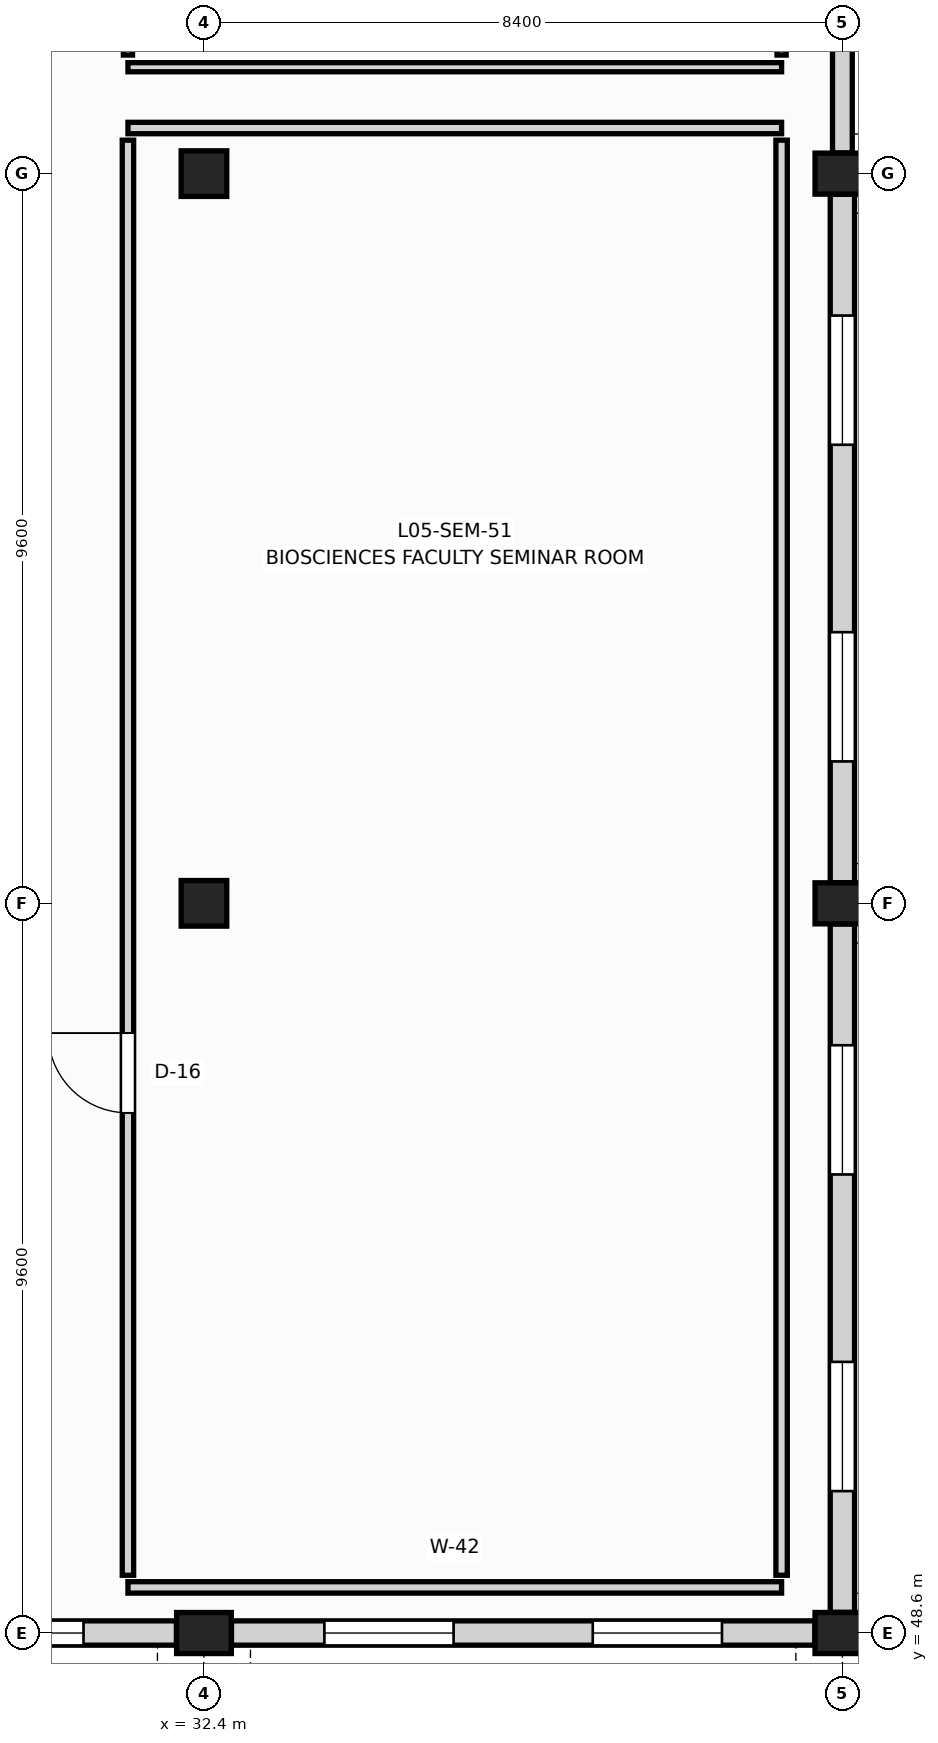
"""IFC4 building model, lengths in metres.
Left out: names, types, materials, properties, quantities, classifications, styles, units other than length and angle.
Written with IfcOpenShell. Run it as: python <this file> out.ifc"""

import sys

from ifc_helpers import new_model, si_unit, direction, frame, frame_2d, origin, origin_2d, place, context, subcontext, project, spatial, rectangle, extrude, element, fill, save


model = new_model("IFC4")
c1 = context("Model", 3, precision=1e-05, world=origin(), true_north=direction((0.0, 1.0)))
c2 = subcontext(c1, "Body", "Model", "MODEL_VIEW")
j1 = project(units=[si_unit("LENGTHUNIT", "METRE"), si_unit("PLANEANGLEUNIT", "RADIAN")], contexts=[c1])
p1 = place(None, origin())
s1 = spatial("IfcSite", under=j1, at=p1, CompositionType="ELEMENT")
p2 = place(p1, origin())
s2 = spatial("IfcBuilding", under=s1, at=p2, CompositionType="ELEMENT")
p3 = place(p2, frame((0.0, 0.0, 22.5)))
s3 = spatial("IfcBuildingStorey", under=s2, at=p3, CompositionType="ELEMENT", Elevation=22.5)
p4 = place(p3, frame((32.4, 48.6, 0.0), z_axis=(0.0, 0.0, 1.0), x_axis=(1.0, 0.0, 0.0)))
e1 = element("IfcColumn", 1, at=p4, inside=s3, PredefinedType="COLUMN", context=c2, shape_type="SweptSolid", body=[
    extrude(rectangle(XDim=0.72, YDim=0.54, at=origin_2d()), origin(), (0.0, 0.0, 1.0), 3.98),
])
for number, where, z_axis, x_axis in (
    (2, (32.4, 58.2, 0.0), (0.0, 0.0, 1.0), (1.0, 0.0, 0.0)),
    (3, (32.4, 67.8, 0.0), (0.0, 0.0, 1.0), (1.0, 0.0, 0.0)),
):
    element("IfcColumn", number, at=place(p3, frame(where, z_axis=z_axis, x_axis=x_axis)), inside=s3, PredefinedType="COLUMN", context=c2, shape_type="SweptSolid", body=[
        extrude(rectangle(XDim=0.6, YDim=0.6, at=origin_2d()), origin(), (0.0, 0.0, 1.0), 3.98),
    ])
for number, where, z_axis, x_axis in (
    (4, (40.8, 48.6, 0.0), (0.0, 0.0, 1.0), (1.0, 0.0, 0.0)),
    (5, (40.8, 58.2, 0.0), (0.0, 0.0, 1.0), (1.0, 0.0, 0.0)),
    (6, (40.8, 67.8, 0.0), (0.0, 0.0, 1.0), (1.0, 0.0, 0.0)),
):
    element("IfcColumn", number, at=place(p3, frame(where, z_axis=z_axis, x_axis=x_axis)), inside=s3, PredefinedType="COLUMN", context=c2, shape_type="SweptSolid", body=[
        extrude(rectangle(XDim=0.72, YDim=0.54, at=origin_2d()), origin(), (0.0, 0.0, 1.0), 3.98),
    ])
p5 = place(p3, frame((40.8, 48.872, 0.0), z_axis=(0.0, 0.0, 1.0), x_axis=(0.0, 1.0, 0.0)))
e7 = element("IfcWall", 7, at=p5, inside=s3, PredefinedType="SOLIDWALL", context=c2, shape_type="SweptSolid", body=[
    extrude(rectangle(XDim=9.056, YDim=0.32, at=frame_2d((4.528, 0.0))), origin(), (0.0, 0.0, 1.0), 3.08),
])
p6 = place(p5, frame((1.595, 0.0, 0.9)))
e8 = element("IfcOpeningElement", 8, at=p6, cuts=e7, PredefinedType="OPENING", context=c2, shape_type="SweptSolid", body=[
    extrude(rectangle(XDim=1.7, YDim=1.8, at=frame_2d((0.85, 0.9))), frame((0.0, 0.17, 0.0), z_axis=(0.0, -1.0, 0.0), x_axis=(1.0, 0.0, 0.0)), (0.0, 0.0, 1.0), 0.34),
])
p7 = place(p5, frame((5.761, 0.0, 0.9)))
e9 = element("IfcOpeningElement", 9, at=p7, cuts=e7, PredefinedType="OPENING", context=c2, shape_type="SweptSolid", body=[
    extrude(rectangle(XDim=1.7, YDim=1.8, at=frame_2d((0.85, 0.9))), frame((0.0, 0.17, 0.0), z_axis=(0.0, -1.0, 0.0), x_axis=(1.0, 0.0, 0.0)), (0.0, 0.0, 1.0), 0.34),
])
p8 = place(p3, frame((40.8, 58.472, 0.0), z_axis=(0.0, 0.0, 1.0), x_axis=(0.0, 1.0, 0.0)))
e10 = element("IfcWall", 10, at=p8, inside=s3, PredefinedType="SOLIDWALL", context=c2, shape_type="SweptSolid", body=[
    extrude(rectangle(XDim=9.056, YDim=0.32, at=frame_2d((4.528, 0.0))), origin(), (0.0, 0.0, 1.0), 3.08),
])
p9 = place(p8, frame((1.595, 0.0, 0.9)))
e11 = element("IfcOpeningElement", 11, at=p9, cuts=e10, PredefinedType="OPENING", context=c2, shape_type="SweptSolid", body=[
    extrude(rectangle(XDim=1.7, YDim=1.8, at=frame_2d((0.85, 0.9))), frame((0.0, 0.17, 0.0), z_axis=(0.0, -1.0, 0.0), x_axis=(1.0, 0.0, 0.0)), (0.0, 0.0, 1.0), 0.34),
])
p10 = place(p8, frame((5.761, 0.0, 0.9)))
e12 = element("IfcOpeningElement", 12, at=p10, cuts=e10, PredefinedType="OPENING", context=c2, shape_type="SweptSolid", body=[
    extrude(rectangle(XDim=1.7, YDim=1.8, at=frame_2d((0.85, 0.9))), frame((0.0, 0.17, 0.0), z_axis=(0.0, -1.0, 0.0), x_axis=(1.0, 0.0, 0.0)), (0.0, 0.0, 1.0), 0.34),
])
p11 = place(p3, frame((40.8, 68.072, 0.0), z_axis=(0.0, 0.0, 1.0), x_axis=(0.0, 1.0, 0.0)))
e13 = element("IfcWall", 13, at=p11, inside=s3, PredefinedType="SOLIDWALL", context=c2, shape_type="SweptSolid", body=[
    extrude(rectangle(XDim=9.056, YDim=0.26, at=frame_2d((4.528, 0.0))), origin(), (0.0, 0.0, 1.0), 3.08),
])
p12 = place(p11, frame((1.595, 0.0, 0.9)))
e14 = element("IfcOpeningElement", 14, at=p12, cuts=e13, PredefinedType="OPENING", context=c2, shape_type="SweptSolid", body=[
    extrude(rectangle(XDim=1.7, YDim=1.8, at=frame_2d((0.85, 0.9))), frame((0.0, 0.14, 0.0), z_axis=(0.0, -1.0, 0.0), x_axis=(1.0, 0.0, 0.0)), (0.0, 0.0, 1.0), 0.28),
])
p13 = place(p11, frame((5.761, 0.0, 0.9)))
e15 = element("IfcOpeningElement", 15, at=p13, cuts=e13, PredefinedType="OPENING", context=c2, shape_type="SweptSolid", body=[
    extrude(rectangle(XDim=1.7, YDim=1.8, at=frame_2d((0.85, 0.9))), frame((0.0, 0.14, 0.0), z_axis=(0.0, -1.0, 0.0), x_axis=(1.0, 0.0, 0.0)), (0.0, 0.0, 1.0), 0.28),
])
p14 = place(p3, frame((24.362, 48.6, 0.0), z_axis=(0.0, 0.0, 1.0), x_axis=(1.0, 0.0, 0.0)))
e16 = element("IfcWall", 16, at=p14, inside=s3, PredefinedType="SOLIDWALL", context=c2, shape_type="SweptSolid", body=[
    extrude(rectangle(XDim=7.676, YDim=0.32, at=frame_2d((3.838, 0.0))), origin(), (0.0, 0.0, 1.0), 3.08),
])
p15 = place(p14, frame((1.222, 0.0, 0.9)))
e17 = element("IfcOpeningElement", 17, at=p15, cuts=e16, PredefinedType="OPENING", context=c2, shape_type="SweptSolid", body=[
    extrude(rectangle(XDim=1.7, YDim=1.8, at=frame_2d((0.85, 0.9))), frame((0.0, 0.17, 0.0), z_axis=(0.0, -1.0, 0.0), x_axis=(1.0, 0.0, 0.0)), (0.0, 0.0, 1.0), 0.34),
])
p16 = place(p14, frame((4.753, 0.0, 0.9)))
e18 = element("IfcOpeningElement", 18, at=p16, cuts=e16, PredefinedType="OPENING", context=c2, shape_type="SweptSolid", body=[
    extrude(rectangle(XDim=1.7, YDim=1.8, at=frame_2d((0.85, 0.9))), frame((0.0, 0.17, 0.0), z_axis=(0.0, -1.0, 0.0), x_axis=(1.0, 0.0, 0.0)), (0.0, 0.0, 1.0), 0.34),
])
p17 = place(p3, frame((32.762, 48.6, 0.0), z_axis=(0.0, 0.0, 1.0), x_axis=(1.0, 0.0, 0.0)))
e19 = element("IfcWall", 19, at=p17, inside=s3, PredefinedType="SOLIDWALL", context=c2, shape_type="SweptSolid", body=[
    extrude(rectangle(XDim=7.676, YDim=0.32, at=frame_2d((3.838, 0.0))), origin(), (0.0, 0.0, 1.0), 3.08),
])
p18 = place(p17, frame((1.222, 0.0, 0.9)))
e20 = element("IfcOpeningElement", 20, at=p18, cuts=e19, PredefinedType="OPENING", context=c2, shape_type="SweptSolid", body=[
    extrude(rectangle(XDim=1.7, YDim=1.8, at=frame_2d((0.85, 0.9))), frame((0.0, 0.17, 0.0), z_axis=(0.0, -1.0, 0.0), x_axis=(1.0, 0.0, 0.0)), (0.0, 0.0, 1.0), 0.34),
])
p19 = place(p17, frame((4.753, 0.0, 0.9)))
e21 = element("IfcOpeningElement", 21, at=p19, cuts=e19, PredefinedType="OPENING", context=c2, shape_type="SweptSolid", body=[
    extrude(rectangle(XDim=1.7, YDim=1.8, at=frame_2d((0.85, 0.9))), frame((0.0, 0.17, 0.0), z_axis=(0.0, -1.0, 0.0), x_axis=(1.0, 0.0, 0.0)), (0.0, 0.0, 1.0), 0.34),
])
for number, where, z_axis, x_axis in (
    (22, (31.4, 49.2, 0.0), (0.0, 0.0, 1.0), (1.0, 0.0, 0.0)),
    (23, (31.4, 68.4, 0.0), (0.0, 0.0, 1.0), (1.0, 0.0, 0.0)),
):
    element("IfcWall", number, at=place(p3, frame(where, z_axis=z_axis, x_axis=x_axis)), inside=s3, PredefinedType="PARTITIONING", context=c2, shape_type="SweptSolid", body=[
        extrude(rectangle(XDim=8.6, YDim=0.15, at=frame_2d((4.3, 0.0))), origin(), (0.0, 0.0, 1.0), 3.15),
    ])
p20 = place(p3, frame((31.4, 49.36, 0.0), z_axis=(0.0, 0.0, 1.0), x_axis=(0.0, 1.0, 0.0)))
e24 = element("IfcWall", 24, at=p20, inside=s3, PredefinedType="PARTITIONING", context=c2, shape_type="SweptSolid", body=[
    extrude(rectangle(XDim=18.88, YDim=0.15, at=frame_2d((9.44, 0.0))), origin(), (0.0, 0.0, 1.0), 3.15),
])
p21 = place(p20, frame((6.083, 0.0, 0.0)))
e25 = element("IfcOpeningElement", 25, at=p21, cuts=e24, PredefinedType="OPENING", context=c2, shape_type="SweptSolid", body=[
    extrude(rectangle(XDim=1.05, YDim=2.2, at=frame_2d((0.525, 1.1))), frame((0.0, 0.085, 0.0), z_axis=(0.0, -1.0, 0.0), x_axis=(1.0, 0.0, 0.0)), (0.0, 0.0, 1.0), 0.17),
])
p22 = place(p3, frame((40.0, 49.36, 0.0), z_axis=(0.0, 0.0, 1.0), x_axis=(0.0, 1.0, 0.0)))
e26 = element("IfcWall", 26, at=p22, inside=s3, PredefinedType="PARTITIONING", context=c2, shape_type="SweptSolid", body=[
    extrude(rectangle(XDim=18.88, YDim=0.15, at=frame_2d((9.44, 0.0))), origin(), (0.0, 0.0, 1.0), 3.15),
])
p23 = place(p3, frame((31.4, 69.2, 0.0), z_axis=(0.0, 0.0, 1.0), x_axis=(1.0, 0.0, 0.0)))
e27 = element("IfcWall", 27, at=p23, inside=s3, PredefinedType="PARTITIONING", context=c2, shape_type="SweptSolid", body=[
    extrude(rectangle(XDim=8.6, YDim=0.12, at=frame_2d((4.3, 0.0))), origin(), (0.0, 0.0, 1.0), 3.15),
])
p24 = place(p3, frame((31.4, 69.36, 0.0), z_axis=(0.0, 0.0, 1.0), x_axis=(0.0, 1.0, 0.0)))
e28 = element("IfcWall", 28, at=p24, inside=s3, PredefinedType="PARTITIONING", context=c2, shape_type="SweptSolid", body=[
    extrude(rectangle(XDim=16.68, YDim=0.12, at=frame_2d((8.34, 0.0))), origin(), (0.0, 0.0, 1.0), 3.15),
])
p25 = place(p24, frame((5.363, 0.0, 0.0)))
e29 = element("IfcOpeningElement", 29, at=p25, cuts=e28, PredefinedType="OPENING", context=c2, shape_type="SweptSolid", body=[
    extrude(rectangle(XDim=0.95, YDim=2.15, at=frame_2d((0.475, 1.075))), frame((0.0, 0.07, 0.0), z_axis=(0.0, -1.0, 0.0), x_axis=(1.0, 0.0, 0.0)), (0.0, 0.0, 1.0), 0.14),
])
p26 = place(p3, frame((40.0, 69.36, 0.0), z_axis=(0.0, 0.0, 1.0), x_axis=(0.0, 1.0, 0.0)))
e30 = element("IfcWall", 30, at=p26, inside=s3, PredefinedType="PARTITIONING", context=c2, shape_type="SweptSolid", body=[
    extrude(rectangle(XDim=16.68, YDim=0.12, at=frame_2d((8.34, 0.0))), origin(), (0.0, 0.0, 1.0), 3.15),
])
p27 = place(p6, origin())
e31 = element("IfcWindow", 31, at=p27, inside=s3, PartitioningType="SINGLE_PANEL", PredefinedType="WINDOW", context=c2, shape_type="SweptSolid", body=[
    extrude(rectangle(XDim=1.7, YDim=1.8, at=frame_2d((0.85, 0.9))), frame((0.0, 0.03, 0.0), z_axis=(0.0, -1.0, 0.0), x_axis=(1.0, 0.0, 0.0)), (0.0, 0.0, 1.0), 0.06),
])
fill(e8, e31)
p28 = place(p7, origin())
e32 = element("IfcWindow", 32, at=p28, inside=s3, PartitioningType="SINGLE_PANEL", PredefinedType="WINDOW", context=c2, shape_type="SweptSolid", body=[
    extrude(rectangle(XDim=1.7, YDim=1.8, at=frame_2d((0.85, 0.9))), frame((0.0, 0.03, 0.0), z_axis=(0.0, -1.0, 0.0), x_axis=(1.0, 0.0, 0.0)), (0.0, 0.0, 1.0), 0.06),
])
fill(e9, e32)
p29 = place(p9, origin())
e33 = element("IfcWindow", 33, at=p29, inside=s3, PartitioningType="SINGLE_PANEL", PredefinedType="WINDOW", context=c2, shape_type="SweptSolid", body=[
    extrude(rectangle(XDim=1.7, YDim=1.8, at=frame_2d((0.85, 0.9))), frame((0.0, 0.03, 0.0), z_axis=(0.0, -1.0, 0.0), x_axis=(1.0, 0.0, 0.0)), (0.0, 0.0, 1.0), 0.06),
])
fill(e11, e33)
p30 = place(p10, origin())
e34 = element("IfcWindow", 34, at=p30, inside=s3, PartitioningType="SINGLE_PANEL", PredefinedType="WINDOW", context=c2, shape_type="SweptSolid", body=[
    extrude(rectangle(XDim=1.7, YDim=1.8, at=frame_2d((0.85, 0.9))), frame((0.0, 0.03, 0.0), z_axis=(0.0, -1.0, 0.0), x_axis=(1.0, 0.0, 0.0)), (0.0, 0.0, 1.0), 0.06),
])
fill(e12, e34)
p31 = place(p16, origin())
e35 = element("IfcWindow", 35, at=p31, inside=s3, PartitioningType="SINGLE_PANEL", PredefinedType="WINDOW", context=c2, shape_type="SweptSolid", body=[
    extrude(rectangle(XDim=1.7, YDim=1.8, at=frame_2d((0.85, 0.9))), frame((0.0, 0.03, 0.0), z_axis=(0.0, -1.0, 0.0), x_axis=(1.0, 0.0, 0.0)), (0.0, 0.0, 1.0), 0.06),
])
fill(e18, e35)
p32 = place(p18, origin())
e36 = element("IfcWindow", 36, at=p32, inside=s3, PartitioningType="SINGLE_PANEL", PredefinedType="WINDOW", context=c2, shape_type="SweptSolid", body=[
    extrude(rectangle(XDim=1.7, YDim=1.8, at=frame_2d((0.85, 0.9))), frame((0.0, 0.03, 0.0), z_axis=(0.0, -1.0, 0.0), x_axis=(1.0, 0.0, 0.0)), (0.0, 0.0, 1.0), 0.06),
])
fill(e20, e36)
p33 = place(p19, origin())
e37 = element("IfcWindow", 37, at=p33, inside=s3, PartitioningType="SINGLE_PANEL", PredefinedType="WINDOW", context=c2, shape_type="SweptSolid", body=[
    extrude(rectangle(XDim=1.7, YDim=1.8, at=frame_2d((0.85, 0.9))), frame((0.0, 0.03, 0.0), z_axis=(0.0, -1.0, 0.0), x_axis=(1.0, 0.0, 0.0)), (0.0, 0.0, 1.0), 0.06),
])
fill(e21, e37)
p34 = place(p21, origin())
e38 = element("IfcDoor", 38, at=p34, inside=s3, OperationType="SINGLE_SWING_RIGHT", PredefinedType="DOOR", context=c2, shape_type="SweptSolid", body=[
    extrude(rectangle(XDim=1.05, YDim=2.2, at=frame_2d((0.525, 1.1))), frame((0.0, 0.025, 0.0), z_axis=(0.0, -1.0, 0.0), x_axis=(1.0, 0.0, 0.0)), (0.0, 0.0, 1.0), 0.05),
])
fill(e25, e38)
save(model, sys.argv[1])
